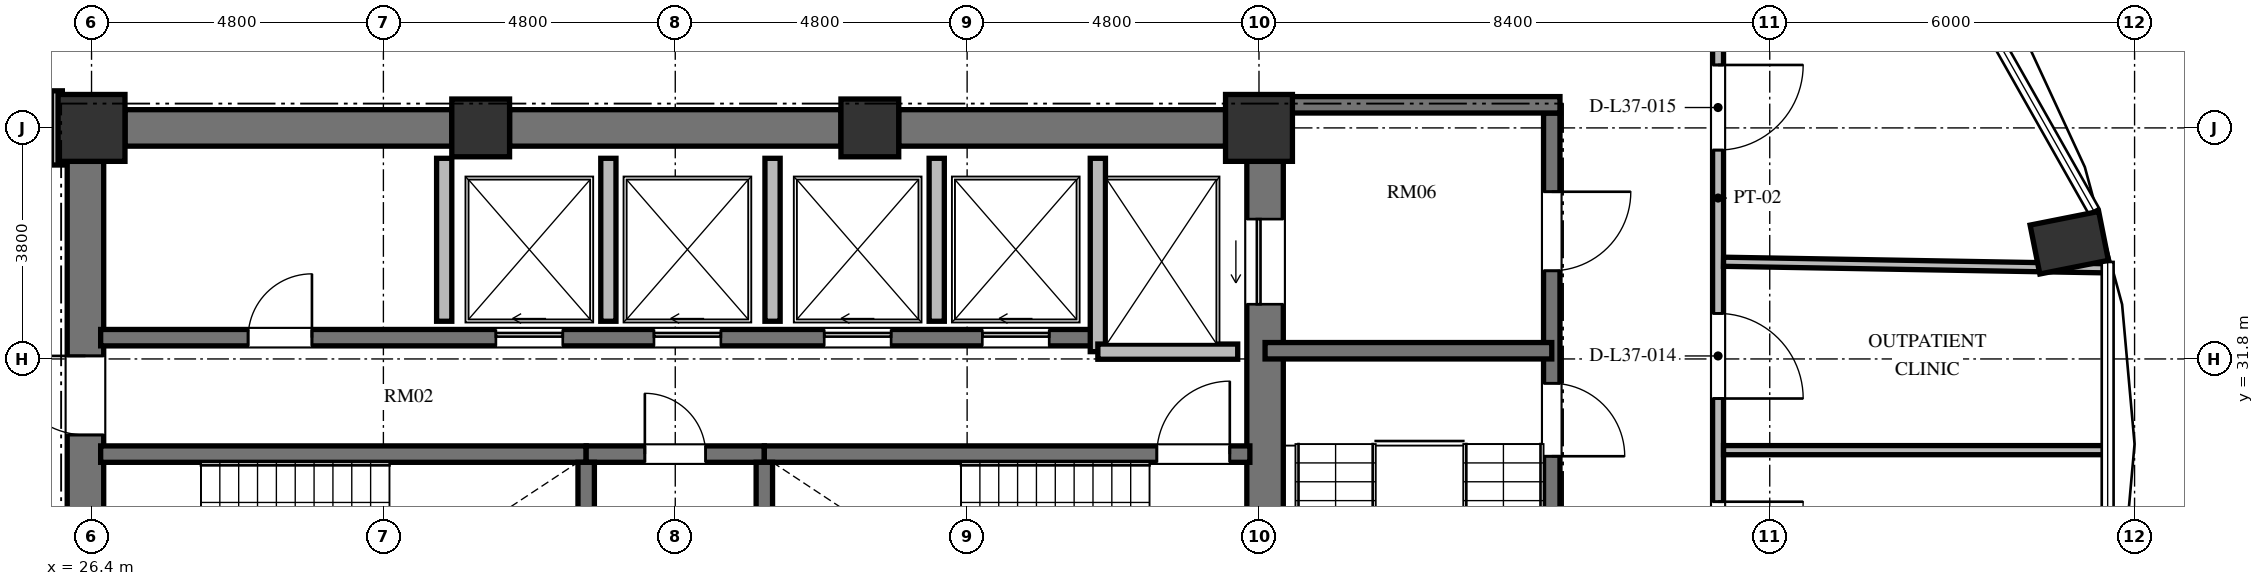
"""IFC4 building model, lengths in metres.
Left out: names, types, materials, properties, quantities, classifications, styles, units other than length and angle.
Written with IfcOpenShell. Run it as: python <this file> out.ifc"""

import sys

from ifc_helpers import new_model, si_unit, direction, frame, frame_2d, origin, origin_2d, place, context, subcontext, project, spatial, rectangle, extrude, element, fill, save


model = new_model("IFC4")
c1 = context("Model", 3, precision=1e-05, world=origin(), true_north=direction((0.0, 1.0)))
c2 = subcontext(c1, "Body", "Model", "MODEL_VIEW")
j1 = project(units=[si_unit("LENGTHUNIT", "METRE"), si_unit("PLANEANGLEUNIT", "RADIAN")], contexts=[c1])
p1 = place(None, origin())
s1 = spatial("IfcSite", under=j1, at=p1, CompositionType="ELEMENT")
p2 = place(p1, origin())
s2 = spatial("IfcBuilding", under=s1, at=p2, CompositionType="ELEMENT")
p3 = place(p2, frame((0.0, 0.0, 145.584)))
s3 = spatial("IfcBuildingStorey", under=s2, at=p3, CompositionType="ELEMENT", Elevation=145.584)
p4 = place(p3, frame((58.926, 33.712, 0.0), z_axis=(0.0, 0.0, 1.0), x_axis=(0.980785280403, 0.195090322016, 0.0)))
e1 = element("IfcColumn", 1, at=p4, inside=s3, PredefinedType="COLUMN", context=c2, shape_type="SweptSolid", body=[
    extrude(rectangle(XDim=1.15, YDim=0.82, at=origin_2d()), origin(), (0.0, 0.0, 1.0), 3.648),
])
p5 = place(p3, frame((45.6, 35.6, 0.0), z_axis=(0.0, 0.0, 1.0), x_axis=(1.0, 0.0, 0.0)))
e2 = element("IfcColumn", 2, at=p5, inside=s3, PredefinedType="COLUMN", context=c2, shape_type="SweptSolid", body=[
    extrude(rectangle(XDim=1.1, YDim=1.1, at=origin_2d()), origin(), (0.0, 0.0, 1.0), 3.648),
])
for number, where, z_axis, x_axis in (
    (3, (39.2, 35.6, 0.0), (0.0, 0.0, 1.0), (1.0, 0.0, 0.0)),
    (4, (32.8, 35.6, 0.0), (0.0, 0.0, 1.0), (1.0, 0.0, 0.0)),
):
    element("IfcColumn", number, at=place(p3, frame(where, z_axis=z_axis, x_axis=x_axis)), inside=s3, PredefinedType="COLUMN", context=c2, shape_type="SweptSolid", body=[
        extrude(rectangle(XDim=0.95, YDim=0.95, at=origin_2d()), origin(), (0.0, 0.0, 1.0), 3.648),
    ])
p6 = place(p3, frame((26.4, 35.6, 0.0), z_axis=(0.0, 0.0, 1.0), x_axis=(1.0, 0.0, 0.0)))
e5 = element("IfcColumn", 5, at=p6, inside=s3, PredefinedType="COLUMN", context=c2, shape_type="SweptSolid", body=[
    extrude(rectangle(XDim=1.1, YDim=1.1, at=origin_2d()), origin(), (0.0, 0.0, 1.0), 3.648),
])
p7 = place(p3, frame((26.3, 20.95, 0.0), z_axis=(0.0, 0.0, 1.0), x_axis=(0.0, 1.0, 0.0)))
e6 = element("IfcWall", 6, at=p7, inside=s3, PredefinedType="SHEAR", context=c2, shape_type="SweptSolid", body=[
    extrude(rectangle(XDim=14.1, YDim=0.6, at=frame_2d((7.05, 0.0))), origin(), (0.0, 0.0, 1.0), 3.648),
])
p8 = place(p7, frame((6.5, 0.0, 0.0)))
e7 = element("IfcOpeningElement", 7, at=p8, cuts=e6, PredefinedType="OPENING", context=c2, shape_type="SweptSolid", body=[
    extrude(rectangle(XDim=1.2, YDim=2.15, at=frame_2d((0.6, 1.075))), frame((0.0, 0.31, 0.0), z_axis=(0.0, -1.0, 0.0), x_axis=(1.0, 0.0, 0.0)), (0.0, 0.0, 1.0), 0.62),
])
p9 = place(p7, frame((9.6, 0.0, 0.0)))
e8 = element("IfcOpeningElement", 8, at=p9, cuts=e6, PredefinedType="OPENING", context=c2, shape_type="SweptSolid", body=[
    extrude(rectangle(XDim=1.3, YDim=2.2, at=frame_2d((0.65, 1.1))), frame((0.0, 0.31, 0.0), z_axis=(0.0, -1.0, 0.0), x_axis=(1.0, 0.0, 0.0)), (0.0, 0.0, 1.0), 0.62),
])
p10 = place(p7, frame((3.26, 0.0, 0.0)))
e9 = element("IfcOpeningElement", 9, at=p10, cuts=e6, PredefinedType="OPENING", context=c2, shape_type="SweptSolid", body=[
    extrude(rectangle(XDim=1.3, YDim=2.2, at=frame_2d((0.65, 1.1))), frame((0.0, 0.31, 0.0), z_axis=(0.0, -1.0, 0.0), x_axis=(1.0, 0.0, 0.0)), (0.0, 0.0, 1.0), 0.62),
])
p11 = place(p3, frame((45.7, 20.95, 0.0), z_axis=(0.0, 0.0, 1.0), x_axis=(0.0, 1.0, 0.0)))
e10 = element("IfcWall", 10, at=p11, inside=s3, PredefinedType="SHEAR", context=c2, shape_type="SweptSolid", body=[
    extrude(rectangle(XDim=14.1, YDim=0.6, at=frame_2d((7.05, 0.0))), origin(), (0.0, 0.0, 1.0), 3.648),
])
p12 = place(p11, frame((11.75, 0.0, 0.0)))
e11 = element("IfcOpeningElement", 11, at=p12, cuts=e10, PredefinedType="OPENING", context=c2, shape_type="SweptSolid", body=[
    extrude(rectangle(XDim=1.4, YDim=2.3, at=frame_2d((0.7, 1.15))), frame((0.0, 0.31, 0.0), z_axis=(0.0, -1.0, 0.0), x_axis=(1.0, 0.0, 0.0)), (0.0, 0.0, 1.0), 0.62),
])
p13 = place(p11, frame((0.95, 0.0, 0.0)))
e12 = element("IfcOpeningElement", 12, at=p13, cuts=e10, PredefinedType="OPENING", context=c2, shape_type="SweptSolid", body=[
    extrude(rectangle(XDim=1.4, YDim=2.3, at=frame_2d((0.7, 1.15))), frame((0.0, 0.31, 0.0), z_axis=(0.0, -1.0, 0.0), x_axis=(1.0, 0.0, 0.0)), (0.0, 0.0, 1.0), 0.62),
])
p14 = place(p3, frame((26.95, 35.6, 0.0), z_axis=(0.0, 0.0, 1.0), x_axis=(1.0, 0.0, 0.0)))
e13 = element("IfcWall", 13, at=p14, inside=s3, PredefinedType="SHEAR", context=c2, shape_type="SweptSolid", body=[
    extrude(rectangle(XDim=5.375, YDim=0.6, at=frame_2d((2.688, 0.0))), origin(), (0.0, 0.0, 1.0), 3.648),
])
p15 = place(p3, frame((33.275, 35.6, 0.0), z_axis=(0.0, 0.0, 1.0), x_axis=(1.0, 0.0, 0.0)))
e14 = element("IfcWall", 14, at=p15, inside=s3, PredefinedType="SHEAR", context=c2, shape_type="SweptSolid", body=[
    extrude(rectangle(XDim=5.45, YDim=0.6, at=frame_2d((2.725, 0.0))), origin(), (0.0, 0.0, 1.0), 3.648),
])
p16 = place(p3, frame((39.675, 35.6, 0.0), z_axis=(0.0, 0.0, 1.0), x_axis=(1.0, 0.0, 0.0)))
e15 = element("IfcWall", 15, at=p16, inside=s3, PredefinedType="SHEAR", context=c2, shape_type="SweptSolid", body=[
    extrude(rectangle(XDim=5.375, YDim=0.6, at=frame_2d((2.688, 0.0))), origin(), (0.0, 0.0, 1.0), 3.648),
])
p17 = place(p3, frame((26.55, 30.235, 0.0), z_axis=(0.0, 0.0, 1.0), x_axis=(1.0, 0.0, 0.0)))
e16 = element("IfcWall", 16, at=p17, inside=s3, PredefinedType="SHEAR", context=c2, shape_type="SweptSolid", body=[
    extrude(rectangle(XDim=7.985, YDim=0.27, at=frame_2d((3.992, 0.0))), origin(), (0.0, 0.0, 1.0), 3.648),
])
p18 = place(p3, frame((34.535, 30.235, 0.0), z_axis=(0.0, 0.0, 1.0), x_axis=(1.0, 0.0, 0.0)))
e17 = element("IfcWall", 17, at=p18, inside=s3, PredefinedType="SHEAR", context=c2, shape_type="SweptSolid", body=[
    extrude(rectangle(XDim=2.93, YDim=0.27, at=frame_2d((1.465, 0.0))), origin(), (0.0, 0.0, 1.0), 3.648),
])
p19 = place(p18, frame((0.965, 0.0, 0.0)))
e18 = element("IfcOpeningElement", 18, at=p19, cuts=e17, PredefinedType="OPENING", context=c2, shape_type="SweptSolid", body=[
    extrude(rectangle(XDim=1.0, YDim=2.1, at=frame_2d((0.5, 1.05))), frame((0.0, 0.145, 0.0), z_axis=(0.0, -1.0, 0.0), x_axis=(1.0, 0.0, 0.0)), (0.0, 0.0, 1.0), 0.29),
])
p20 = place(p3, frame((37.465, 30.235, 0.0), z_axis=(0.0, 0.0, 1.0), x_axis=(1.0, 0.0, 0.0)))
e19 = element("IfcWall", 19, at=p20, inside=s3, PredefinedType="SHEAR", context=c2, shape_type="SweptSolid", body=[
    extrude(rectangle(XDim=7.985, YDim=0.27, at=frame_2d((3.992, 0.0))), origin(), (0.0, 0.0, 1.0), 3.648),
])
p21 = place(p20, frame((6.455, 0.0, 0.0)))
e20 = element("IfcOpeningElement", 20, at=p21, cuts=e19, PredefinedType="OPENING", context=c2, shape_type="SweptSolid", body=[
    extrude(rectangle(XDim=1.2, YDim=2.15, at=frame_2d((0.6, 1.075))), frame((0.0, 0.145, 0.0), z_axis=(0.0, -1.0, 0.0), x_axis=(1.0, 0.0, 0.0)), (0.0, 0.0, 1.0), 0.29),
])
for number, where, z_axis, x_axis in (
    (21, (34.535, 26.02, 0.0), (0.0, 0.0, 1.0), (0.0, 1.0, 0.0)),
    (22, (37.465, 26.02, 0.0), (0.0, 0.0, 1.0), (0.0, 1.0, 0.0)),
):
    element("IfcWall", number, at=place(p3, frame(where, z_axis=z_axis, x_axis=x_axis)), inside=s3, PredefinedType="SHEAR", context=c2, shape_type="SweptSolid", body=[
        extrude(rectangle(XDim=4.08, YDim=0.27, at=frame_2d((2.04, 0.0))), origin(), (0.0, 0.0, 1.0), 3.648),
    ])
p22 = place(p3, frame((26.55, 32.15, 0.0), z_axis=(0.0, 0.0, 1.0), x_axis=(1.0, 0.0, 0.0)))
e23 = element("IfcWall", 23, at=p22, inside=s3, PredefinedType="SHEAR", context=c2, shape_type="SweptSolid", body=[
    extrude(rectangle(XDim=16.4, YDim=0.27, at=frame_2d((8.2, 0.0))), origin(), (0.0, 0.0, 1.0), 3.648),
])
p23 = place(p22, frame((2.425, 0.0, 0.0)))
e24 = element("IfcOpeningElement", 24, at=p23, cuts=e23, PredefinedType="OPENING", context=c2, shape_type="SweptSolid", body=[
    extrude(rectangle(XDim=1.05, YDim=2.15, at=frame_2d((0.525, 1.075))), frame((0.0, 0.145, 0.0), z_axis=(0.0, -1.0, 0.0), x_axis=(1.0, 0.0, 0.0)), (0.0, 0.0, 1.0), 0.29),
])
p24 = place(p22, frame((6.5, 0.0, 0.0)))
e25 = element("IfcOpeningElement", 25, at=p24, cuts=e23, PredefinedType="OPENING", context=c2, shape_type="SweptSolid", body=[
    extrude(rectangle(XDim=1.1, YDim=2.2, at=frame_2d((0.55, 1.1))), frame((0.0, 0.145, 0.0), z_axis=(0.0, -1.0, 0.0), x_axis=(1.0, 0.0, 0.0)), (0.0, 0.0, 1.0), 0.29),
])
p25 = place(p22, frame((9.1, 0.0, 0.0)))
e26 = element("IfcOpeningElement", 26, at=p25, cuts=e23, PredefinedType="OPENING", context=c2, shape_type="SweptSolid", body=[
    extrude(rectangle(XDim=1.1, YDim=2.2, at=frame_2d((0.55, 1.1))), frame((0.0, 0.145, 0.0), z_axis=(0.0, -1.0, 0.0), x_axis=(1.0, 0.0, 0.0)), (0.0, 0.0, 1.0), 0.29),
])
p26 = place(p22, frame((11.9, 0.0, 0.0)))
e27 = element("IfcOpeningElement", 27, at=p26, cuts=e23, PredefinedType="OPENING", context=c2, shape_type="SweptSolid", body=[
    extrude(rectangle(XDim=1.1, YDim=2.2, at=frame_2d((0.55, 1.1))), frame((0.0, 0.145, 0.0), z_axis=(0.0, -1.0, 0.0), x_axis=(1.0, 0.0, 0.0)), (0.0, 0.0, 1.0), 0.29),
])
p27 = place(p22, frame((14.5, 0.0, 0.0)))
e28 = element("IfcOpeningElement", 28, at=p27, cuts=e23, PredefinedType="OPENING", context=c2, shape_type="SweptSolid", body=[
    extrude(rectangle(XDim=1.1, YDim=2.2, at=frame_2d((0.55, 1.1))), frame((0.0, 0.145, 0.0), z_axis=(0.0, -1.0, 0.0), x_axis=(1.0, 0.0, 0.0)), (0.0, 0.0, 1.0), 0.29),
])
p28 = place(p3, frame((42.95, 31.92, 0.0), z_axis=(0.0, 0.0, 1.0), x_axis=(0.0, 1.0, 0.0)))
e29 = element("IfcWall", 29, at=p28, inside=s3, PredefinedType="SOLIDWALL", context=c2, shape_type="SweptSolid", body=[
    extrude(rectangle(XDim=3.18, YDim=0.25, at=frame_2d((1.59, 0.0))), origin(), (0.0, 0.0, 1.0), 3.428),
])
p29 = place(p3, frame((42.95, 31.92, 0.0), z_axis=(0.0, 0.0, 1.0), x_axis=(1.0, 0.0, 0.0)))
e30 = element("IfcWall", 30, at=p29, inside=s3, PredefinedType="SOLIDWALL", context=c2, shape_type="SweptSolid", body=[
    extrude(rectangle(XDim=2.3, YDim=0.25, at=frame_2d((1.15, 0.0))), origin(), (0.0, 0.0, 1.0), 3.428),
])
for number, where, z_axis, x_axis in (
    (31, (32.2, 32.42, 0.0), (0.0, 0.0, 1.0), (0.0, 1.0, 0.0)),
    (32, (34.9, 32.42, 0.0), (0.0, 0.0, 1.0), (0.0, 1.0, 0.0)),
    (33, (37.6, 32.42, 0.0), (0.0, 0.0, 1.0), (0.0, 1.0, 0.0)),
    (34, (40.3, 32.42, 0.0), (0.0, 0.0, 1.0), (0.0, 1.0, 0.0)),
):
    element("IfcWall", number, at=place(p3, frame(where, z_axis=z_axis, x_axis=x_axis)), inside=s3, PredefinedType="SOLIDWALL", context=c2, shape_type="SweptSolid", body=[
        extrude(rectangle(XDim=2.68, YDim=0.25, at=frame_2d((1.34, 0.0))), origin(), (0.0, 0.0, 1.0), 3.428),
    ])
p30 = place(p3, frame((50.415, 35.845, 0.0), z_axis=(0.0, 0.0, 1.0), x_axis=(0.0, -1.0, 0.0)))
e35 = element("IfcWall", 35, at=p30, inside=s3, PredefinedType="SHEAR", context=c2, shape_type="SweptSolid", body=[
    extrude(rectangle(XDim=15.825, YDim=0.27, at=frame_2d((7.913, 0.0))), origin(), (0.0, 0.0, 1.0), 3.648),
])
p31 = place(p30, frame((4.445, 0.0, 0.0)))
e36 = element("IfcOpeningElement", 36, at=p31, cuts=e35, PredefinedType="OPENING", context=c2, shape_type="SweptSolid", body=[
    extrude(rectangle(XDim=1.2, YDim=2.15, at=frame_2d((0.6, 1.075))), frame((0.0, 0.145, 0.0), z_axis=(0.0, -1.0, 0.0), x_axis=(1.0, 0.0, 0.0)), (0.0, 0.0, 1.0), 0.29),
])
p32 = place(p30, frame((1.295, 0.0, 0.0)))
e37 = element("IfcOpeningElement", 37, at=p32, cuts=e35, PredefinedType="OPENING", context=c2, shape_type="SweptSolid", body=[
    extrude(rectangle(XDim=1.3, YDim=2.2, at=frame_2d((0.65, 1.1))), frame((0.0, 0.145, 0.0), z_axis=(0.0, -1.0, 0.0), x_axis=(1.0, 0.0, 0.0)), (0.0, 0.0, 1.0), 0.29),
])
p33 = place(p30, frame((13.095, 0.0, 0.0)))
e38 = element("IfcOpeningElement", 38, at=p33, cuts=e35, PredefinedType="OPENING", context=c2, shape_type="SweptSolid", body=[
    extrude(rectangle(XDim=1.3, YDim=2.2, at=frame_2d((0.65, 1.1))), frame((0.0, 0.145, 0.0), z_axis=(0.0, -1.0, 0.0), x_axis=(1.0, 0.0, 0.0)), (0.0, 0.0, 1.0), 0.29),
])
p34 = place(p3, frame((46.0, 35.98, 0.0), z_axis=(0.0, 0.0, 1.0), x_axis=(1.0, 0.0, 0.0)))
e39 = element("IfcWall", 39, at=p34, inside=s3, PredefinedType="SHEAR", context=c2, shape_type="SweptSolid", body=[
    extrude(rectangle(XDim=4.55, YDim=0.27, at=frame_2d((2.275, 0.0))), origin(), (0.0, 0.0, 1.0), 3.648),
])
p35 = place(p3, frame((45.7, 31.935, 0.0), z_axis=(0.0, 0.0, 1.0), x_axis=(1.0, 0.0, 0.0)))
e40 = element("IfcWall", 40, at=p35, inside=s3, PredefinedType="SHEAR", context=c2, shape_type="SweptSolid", body=[
    extrude(rectangle(XDim=4.715, YDim=0.27, at=frame_2d((2.357, 0.0))), origin(), (0.0, 0.0, 1.0), 3.648),
])
p36 = place(p3, frame((53.15, 38.79, 0.0), z_axis=(0.0, 0.0, 1.0), x_axis=(0.0, -1.0, 0.0)))
e41 = element("IfcWall", 41, at=p36, inside=s3, PredefinedType="PARTITIONING", context=c2, shape_type="SweptSolid", body=[
    extrude(rectangle(XDim=17.374, YDim=0.18, at=frame_2d((8.687, 0.0))), origin(), (0.0, 0.0, 1.0), 3.428),
])
p37 = place(p36, frame((12.613, 0.0, 0.0)))
e42 = element("IfcOpeningElement", 42, at=p37, cuts=e41, PredefinedType="OPENING", context=c2, shape_type="SweptSolid", body=[
    extrude(rectangle(XDim=1.05, YDim=2.15, at=frame_2d((0.525, 1.075))), frame((0.0, 0.1, 0.0), z_axis=(0.0, -1.0, 0.0), x_axis=(1.0, 0.0, 0.0)), (0.0, 0.0, 1.0), 0.2),
])
p38 = place(p36, frame((9.338, 0.0, 0.0)))
e43 = element("IfcOpeningElement", 43, at=p38, cuts=e41, PredefinedType="OPENING", context=c2, shape_type="SweptSolid", body=[
    extrude(rectangle(XDim=1.4, YDim=2.2, at=frame_2d((0.7, 1.1))), frame((0.0, 0.1, 0.0), z_axis=(0.0, -1.0, 0.0), x_axis=(1.0, 0.0, 0.0)), (0.0, 0.0, 1.0), 0.2),
])
p39 = place(p36, frame((6.241, 0.0, 0.0)))
e44 = element("IfcOpeningElement", 44, at=p39, cuts=e41, PredefinedType="OPENING", context=c2, shape_type="SweptSolid", body=[
    extrude(rectangle(XDim=1.4, YDim=2.2, at=frame_2d((0.7, 1.1))), frame((0.0, 0.1, 0.0), z_axis=(0.0, -1.0, 0.0), x_axis=(1.0, 0.0, 0.0)), (0.0, 0.0, 1.0), 0.2),
])
p40 = place(p36, frame((2.155, 0.0, 0.0)))
e45 = element("IfcOpeningElement", 45, at=p40, cuts=e41, PredefinedType="OPENING", context=c2, shape_type="SweptSolid", body=[
    extrude(rectangle(XDim=1.4, YDim=2.2, at=frame_2d((0.7, 1.1))), frame((0.0, 0.1, 0.0), z_axis=(0.0, -1.0, 0.0), x_axis=(1.0, 0.0, 0.0)), (0.0, 0.0, 1.0), 0.2),
])
p41 = place(p3, frame((25.83, 36.21, 0.0), z_axis=(0.0, 0.0, 1.0), x_axis=(0.0, -1.0, 0.0)))
e46 = element("IfcWall", 46, at=p41, inside=s3, PredefinedType="PARTITIONING", context=c2, shape_type="SweptSolid", body=[
    extrude(rectangle(XDim=1.22, YDim=0.18, at=frame_2d((0.61, 0.0))), origin(), (0.0, 0.0, 1.0), 3.428),
])
p42 = place(p3, frame((53.24, 30.3, 0.0), z_axis=(0.0, 0.0, 1.0), x_axis=(1.0, 0.0, 0.0)))
e47 = element("IfcWall", 47, at=p42, inside=s3, PredefinedType="PARTITIONING", context=c2, shape_type="SweptSolid", body=[
    extrude(rectangle(XDim=6.307, YDim=0.15, at=frame_2d((3.154, 0.0))), origin(), (0.0, 0.0, 1.0), 3.428),
])
p43 = place(p3, frame((53.24, 33.399, 0.0), z_axis=(0.0, 0.0, 1.0), x_axis=(0.999852374284, -0.017182247791, 0.0)))
e48 = element("IfcWall", 48, at=p43, inside=s3, PredefinedType="PARTITIONING", context=c2, shape_type="SweptSolid", body=[
    extrude(rectangle(XDim=6.323, YDim=0.15, at=frame_2d((3.162, 0.0))), origin(), (0.0, 0.0, 1.0), 3.428),
])
p44 = place(p21, origin())
e49 = element("IfcDoor", 49, at=p44, inside=s3, OperationType="SINGLE_SWING_RIGHT", PredefinedType="DOOR", context=c2, shape_type="SweptSolid", body=[
    extrude(rectangle(XDim=1.2, YDim=2.15, at=frame_2d((0.6, 1.075))), frame((0.0, 0.025, 0.0), z_axis=(0.0, -1.0, 0.0), x_axis=(1.0, 0.0, 0.0)), (0.0, 0.0, 1.0), 0.05),
])
fill(e20, e49)
p45 = place(p19, origin())
e50 = element("IfcDoor", 50, at=p45, inside=s3, OperationType="SINGLE_SWING_LEFT", PredefinedType="DOOR", context=c2, shape_type="SweptSolid", body=[
    extrude(rectangle(XDim=1.0, YDim=2.1, at=frame_2d((0.5, 1.05))), frame((0.0, 0.025, 0.0), z_axis=(0.0, -1.0, 0.0), x_axis=(1.0, 0.0, 0.0)), (0.0, 0.0, 1.0), 0.05),
])
fill(e18, e50)
p46 = place(p9, origin())
e51 = element("IfcDoor", 51, at=p46, inside=s3, OperationType="SINGLE_SWING_RIGHT", PredefinedType="DOOR", context=c2, shape_type="SweptSolid", body=[
    extrude(rectangle(XDim=1.3, YDim=2.2, at=frame_2d((0.65, 1.1))), frame((0.0, 0.025, 0.0), z_axis=(0.0, -1.0, 0.0), x_axis=(1.0, 0.0, 0.0)), (0.0, 0.0, 1.0), 0.05),
])
fill(e8, e51)
p47 = place(p23, origin())
e52 = element("IfcDoor", 52, at=p47, inside=s3, OperationType="SINGLE_SWING_RIGHT", PredefinedType="DOOR", context=c2, shape_type="SweptSolid", body=[
    extrude(rectangle(XDim=1.05, YDim=2.15, at=frame_2d((0.525, 1.075))), frame((0.0, 0.025, 0.0), z_axis=(0.0, -1.0, 0.0), x_axis=(1.0, 0.0, 0.0)), (0.0, 0.0, 1.0), 0.05),
])
fill(e24, e52)
p48 = place(p24, origin())
e53 = element("IfcDoor", 53, at=p48, inside=s3, OperationType="SLIDING_TO_LEFT", PredefinedType="DOOR", context=c2, shape_type="SweptSolid", body=[
    extrude(rectangle(XDim=1.1, YDim=2.2, at=frame_2d((0.55, 1.1))), frame((0.0, 0.025, 0.0), z_axis=(0.0, -1.0, 0.0), x_axis=(1.0, 0.0, 0.0)), (0.0, 0.0, 1.0), 0.05),
])
fill(e25, e53)
p49 = place(p25, origin())
e54 = element("IfcDoor", 54, at=p49, inside=s3, OperationType="SLIDING_TO_LEFT", PredefinedType="DOOR", context=c2, shape_type="SweptSolid", body=[
    extrude(rectangle(XDim=1.1, YDim=2.2, at=frame_2d((0.55, 1.1))), frame((0.0, 0.025, 0.0), z_axis=(0.0, -1.0, 0.0), x_axis=(1.0, 0.0, 0.0)), (0.0, 0.0, 1.0), 0.05),
])
fill(e26, e54)
p50 = place(p26, origin())
e55 = element("IfcDoor", 55, at=p50, inside=s3, OperationType="SLIDING_TO_LEFT", PredefinedType="DOOR", context=c2, shape_type="SweptSolid", body=[
    extrude(rectangle(XDim=1.1, YDim=2.2, at=frame_2d((0.55, 1.1))), frame((0.0, 0.025, 0.0), z_axis=(0.0, -1.0, 0.0), x_axis=(1.0, 0.0, 0.0)), (0.0, 0.0, 1.0), 0.05),
])
fill(e27, e55)
p51 = place(p27, origin())
e56 = element("IfcDoor", 56, at=p51, inside=s3, OperationType="SLIDING_TO_LEFT", PredefinedType="DOOR", context=c2, shape_type="SweptSolid", body=[
    extrude(rectangle(XDim=1.1, YDim=2.2, at=frame_2d((0.55, 1.1))), frame((0.0, 0.025, 0.0), z_axis=(0.0, -1.0, 0.0), x_axis=(1.0, 0.0, 0.0)), (0.0, 0.0, 1.0), 0.05),
])
fill(e28, e56)
p52 = place(p12, origin())
e57 = element("IfcDoor", 57, at=p52, inside=s3, OperationType="SLIDING_TO_LEFT", PredefinedType="DOOR", context=c2, shape_type="SweptSolid", body=[
    extrude(rectangle(XDim=1.4, YDim=2.3, at=frame_2d((0.7, 1.15))), frame((0.0, 0.025, 0.0), z_axis=(0.0, -1.0, 0.0), x_axis=(1.0, 0.0, 0.0)), (0.0, 0.0, 1.0), 0.05),
])
fill(e11, e57)
p53 = place(p31, origin())
e58 = element("IfcDoor", 58, at=p53, inside=s3, OperationType="SINGLE_SWING_RIGHT", PredefinedType="DOOR", context=c2, shape_type="SweptSolid", body=[
    extrude(rectangle(XDim=1.2, YDim=2.15, at=frame_2d((0.6, 1.075))), frame((0.0, 0.025, 0.0), z_axis=(0.0, -1.0, 0.0), x_axis=(1.0, 0.0, 0.0)), (0.0, 0.0, 1.0), 0.05),
])
fill(e36, e58)
p54 = place(p32, origin())
e59 = element("IfcDoor", 59, at=p54, inside=s3, OperationType="SINGLE_SWING_LEFT", PredefinedType="DOOR", context=c2, shape_type="SweptSolid", body=[
    extrude(rectangle(XDim=1.3, YDim=2.2, at=frame_2d((0.65, 1.1))), frame((0.0, 0.025, 0.0), z_axis=(0.0, -1.0, 0.0), x_axis=(1.0, 0.0, 0.0)), (0.0, 0.0, 1.0), 0.05),
])
fill(e37, e59)
p55 = place(p38, origin())
e60 = element("IfcDoor", 60, at=p55, inside=s3, OperationType="SINGLE_SWING_LEFT", PredefinedType="DOOR", context=c2, shape_type="SweptSolid", body=[
    extrude(rectangle(XDim=1.4, YDim=2.2, at=frame_2d((0.7, 1.1))), frame((0.0, 0.025, 0.0), z_axis=(0.0, -1.0, 0.0), x_axis=(1.0, 0.0, 0.0)), (0.0, 0.0, 1.0), 0.05),
])
fill(e43, e60)
p56 = place(p39, origin())
e61 = element("IfcDoor", 61, at=p56, inside=s3, OperationType="SINGLE_SWING_RIGHT", PredefinedType="DOOR", context=c2, shape_type="SweptSolid", body=[
    extrude(rectangle(XDim=1.4, YDim=2.2, at=frame_2d((0.7, 1.1))), frame((0.0, 0.025, 0.0), z_axis=(0.0, -1.0, 0.0), x_axis=(1.0, 0.0, 0.0)), (0.0, 0.0, 1.0), 0.05),
])
fill(e44, e61)
p57 = place(p40, origin())
e62 = element("IfcDoor", 62, at=p57, inside=s3, OperationType="SINGLE_SWING_LEFT", PredefinedType="DOOR", context=c2, shape_type="SweptSolid", body=[
    extrude(rectangle(XDim=1.4, YDim=2.2, at=frame_2d((0.7, 1.1))), frame((0.0, 0.025, 0.0), z_axis=(0.0, -1.0, 0.0), x_axis=(1.0, 0.0, 0.0)), (0.0, 0.0, 1.0), 0.05),
])
fill(e45, e62)
save(model, sys.argv[1])
